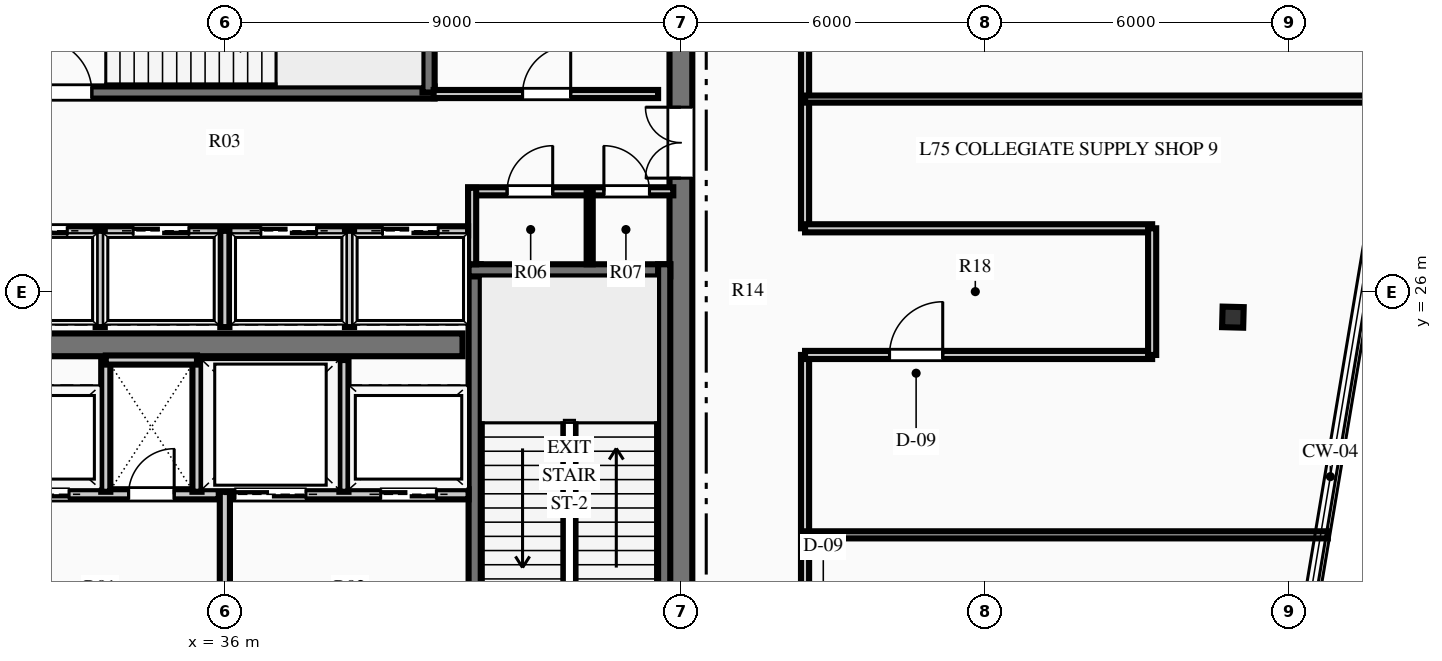
"""IFC4 building model, lengths in metres.
Left out: names, types, materials, properties, quantities, classifications, styles, units other than length and angle.
Written with IfcOpenShell. Run it as: python <this file> out.ifc"""

import sys

from ifc_helpers import new_model, si_unit, direction, frame, frame_2d, origin, origin_2d, place, context, subcontext, project, spatial, rectangle, i_section, extrude, element, fill, save


model = new_model("IFC4")
c1 = context("Model", 3, precision=1e-05, world=origin(), true_north=direction((0.0, 1.0)))
c2 = subcontext(c1, "Body", "Model", "MODEL_VIEW")
j1 = project(units=[si_unit("LENGTHUNIT", "METRE"), si_unit("PLANEANGLEUNIT", "RADIAN")], contexts=[c1])
p1 = place(None, origin())
s1 = spatial("IfcSite", under=j1, at=p1, CompositionType="ELEMENT")
p2 = place(p1, origin())
s2 = spatial("IfcBuilding", under=s1, at=p2, CompositionType="ELEMENT")
p3 = place(p2, frame((0.0, 0.0, 298.2)))
s3 = spatial("IfcBuildingStorey", under=s2, at=p3, CompositionType="ELEMENT", Elevation=298.2)
p4 = place(p3, frame((45.0, 18.225, 0.0), z_axis=(0.0, 0.0, 1.0), x_axis=(0.0, 1.0, 0.0)))
e1 = element("IfcWall", 1, at=p4, inside=s3, PredefinedType="SHEAR", context=c2, shape_type="SweptSolid", body=[
    extrude(rectangle(XDim=15.55, YDim=0.45, at=frame_2d((7.775, 0.0))), origin(), (0.0, 0.0, 1.0), 4.5),
])
p5 = place(p4, frame((10.015, 0.0, 0.0)))
e2 = element("IfcOpeningElement", 2, at=p5, cuts=e1, PredefinedType="OPENING", context=c2, shape_type="SweptSolid", body=[
    extrude(rectangle(XDim=1.4, YDim=2.2, at=frame_2d((0.7, 1.1))), frame((0.0, 0.235, 0.0), z_axis=(0.0, -1.0, 0.0), x_axis=(1.0, 0.0, 0.0)), (0.0, 0.0, 1.0), 0.47),
])
p6 = place(p3, frame((31.31, 24.95, 0.0), z_axis=(0.0, 0.0, 1.0), x_axis=(1.0, 0.0, 0.0)))
e3 = element("IfcWall", 3, at=p6, inside=s3, PredefinedType="SHEAR", context=c2, shape_type="SweptSolid", body=[
    extrude(rectangle(XDim=9.38, YDim=0.45, at=frame_2d((4.69, 0.0))), origin(), (0.0, 0.0, 1.0), 4.5),
])
p7 = place(p3, frame((40.93, 18.28, 0.0), z_axis=(0.0, 0.0, 1.0), x_axis=(0.0, 1.0, 0.0)))
e4 = element("IfcWall", 4, at=p7, inside=s3, PredefinedType="SHEAR", context=c2, shape_type="SweptSolid", body=[
    extrude(rectangle(XDim=8.26, YDim=0.24, at=frame_2d((4.13, 0.0))), origin(), (0.0, 0.0, 1.0), 4.5),
])
p8 = place(p7, frame((0.365, 0.0, 0.0)))
e5 = element("IfcOpeningElement", 5, at=p8, cuts=e4, PredefinedType="OPENING", context=c2, shape_type="SweptSolid", body=[
    extrude(rectangle(XDim=1.05, YDim=2.15, at=frame_2d((0.525, 1.075))), frame((0.0, 0.13, 0.0), z_axis=(0.0, -1.0, 0.0), x_axis=(1.0, 0.0, 0.0)), (0.0, 0.0, 1.0), 0.26),
])
p9 = place(p3, frame((40.81, 26.42, 0.0), z_axis=(0.0, 0.0, 1.0), x_axis=(1.0, 0.0, 0.0)))
e6 = element("IfcWall", 6, at=p9, inside=s3, PredefinedType="SHEAR", context=c2, shape_type="SweptSolid", body=[
    extrude(rectangle(XDim=3.98, YDim=0.24, at=frame_2d((1.99, 0.0))), origin(), (0.0, 0.0, 1.0), 4.5),
])
p10 = place(p3, frame((44.67, 18.28, 0.0), z_axis=(0.0, 0.0, 1.0), x_axis=(0.0, 1.0, 0.0)))
e7 = element("IfcWall", 7, at=p10, inside=s3, PredefinedType="SHEAR", context=c2, shape_type="SweptSolid", body=[
    extrude(rectangle(XDim=8.26, YDim=0.24, at=frame_2d((4.13, 0.0))), origin(), (0.0, 0.0, 1.0), 4.5),
])
p11 = place(p3, frame((31.76, 29.93, 0.0), z_axis=(0.0, 0.0, 1.0), x_axis=(1.0, 0.0, 0.0)))
e8 = element("IfcWall", 8, at=p11, inside=s3, PredefinedType="SHEAR", context=c2, shape_type="SweptSolid", body=[
    extrude(rectangle(XDim=8.38, YDim=0.24, at=frame_2d((4.19, 0.0))), origin(), (0.0, 0.0, 1.0), 4.5),
])
p12 = place(p11, frame((0.565, 0.0, 0.0)))
e9 = element("IfcOpeningElement", 9, at=p12, cuts=e8, PredefinedType="OPENING", context=c2, shape_type="SweptSolid", body=[
    extrude(rectangle(XDim=1.05, YDim=2.15, at=frame_2d((0.525, 1.075))), frame((0.0, 0.13, 0.0), z_axis=(0.0, -1.0, 0.0), x_axis=(1.0, 0.0, 0.0)), (0.0, 0.0, 1.0), 0.26),
])
p13 = place(p3, frame((40.02, 29.93, 0.0), z_axis=(0.0, 0.0, 1.0), x_axis=(0.0, 1.0, 0.0)))
e10 = element("IfcWall", 10, at=p13, inside=s3, PredefinedType="SHEAR", context=c2, shape_type="SweptSolid", body=[
    extrude(rectangle(XDim=3.85, YDim=0.24, at=frame_2d((1.925, 0.0))), origin(), (0.0, 0.0, 1.0), 4.5),
])
p14 = place(p3, frame((55.894, 25.496, 0.0), z_axis=(0.0, 0.0, 1.0), x_axis=(0.025304572866, 0.999679788028, 0.0)))
e11 = element("IfcColumn", 11, at=p14, inside=s3, PredefinedType="COLUMN", context=c2, shape_type="SweptSolid", body=[
    extrude(i_section(OverallWidth=0.406, OverallDepth=0.416, WebThickness=0.03, FlangeThickness=0.048, at=origin_2d()), origin(), (0.0, 0.0, 1.0), 4.5),
])
p15 = place(p3, frame((36.0, 18.28, 0.0), z_axis=(0.0, 0.0, 1.0), x_axis=(0.0, 1.0, 0.0)))
e12 = element("IfcWall", 12, at=p15, inside=s3, PredefinedType="PARTITIONING", context=c2, shape_type="SweptSolid", body=[
    extrude(rectangle(XDim=3.77, YDim=0.2, at=frame_2d((1.885, 0.0))), origin(), (0.0, 0.0, 1.0), 4.24),
])
p16 = place(p3, frame((31.19, 22.0, 0.0), z_axis=(0.0, 0.0, 1.0), x_axis=(1.0, 0.0, 0.0)))
e13 = element("IfcWall", 13, at=p16, inside=s3, PredefinedType="PARTITIONING", context=c2, shape_type="SweptSolid", body=[
    extrude(rectangle(XDim=4.69, YDim=0.2, at=frame_2d((2.345, 0.0))), origin(), (0.0, 0.0, 1.0), 4.24),
])
p17 = place(p16, frame((2.91, 0.0, 0.0)))
e14 = element("IfcOpeningElement", 14, at=p17, cuts=e13, PredefinedType="OPENING", context=c2, shape_type="SweptSolid", body=[
    extrude(rectangle(XDim=0.9, YDim=2.15, at=frame_2d((0.45, 1.075))), frame((0.0, 0.11, 0.0), z_axis=(0.0, -1.0, 0.0), x_axis=(1.0, 0.0, 0.0)), (0.0, 0.0, 1.0), 0.22),
])
p18 = place(p16, frame((0.635, 0.0, 0.0)))
e15 = element("IfcOpeningElement", 15, at=p18, cuts=e13, PredefinedType="OPENING", context=c2, shape_type="SweptSolid", body=[
    extrude(rectangle(XDim=1.1, YDim=2.15, at=frame_2d((0.55, 1.075))), frame((0.0, 0.11, 0.0), z_axis=(0.0, -1.0, 0.0), x_axis=(1.0, 0.0, 0.0)), (0.0, 0.0, 1.0), 0.22),
])
p19 = place(p3, frame((36.12, 22.0, 0.0), z_axis=(0.0, 0.0, 1.0), x_axis=(1.0, 0.0, 0.0)))
e16 = element("IfcWall", 16, at=p19, inside=s3, PredefinedType="PARTITIONING", context=c2, shape_type="SweptSolid", body=[
    extrude(rectangle(XDim=4.69, YDim=0.2, at=frame_2d((2.345, 0.0))), origin(), (0.0, 0.0, 1.0), 4.24),
])
p20 = place(p19, frame((2.955, 0.0, 0.0)))
e17 = element("IfcOpeningElement", 17, at=p20, cuts=e16, PredefinedType="OPENING", context=c2, shape_type="SweptSolid", body=[
    extrude(rectangle(XDim=1.1, YDim=2.15, at=frame_2d((0.55, 1.075))), frame((0.0, 0.11, 0.0), z_axis=(0.0, -1.0, 0.0), x_axis=(1.0, 0.0, 0.0)), (0.0, 0.0, 1.0), 0.22),
])
p21 = place(p19, frame((0.08, 0.0, 0.0)))
e18 = element("IfcOpeningElement", 18, at=p21, cuts=e16, PredefinedType="OPENING", context=c2, shape_type="SweptSolid", body=[
    extrude(rectangle(XDim=1.4, YDim=2.2, at=frame_2d((0.7, 1.1))), frame((0.0, 0.11, 0.0), z_axis=(0.0, -1.0, 0.0), x_axis=(1.0, 0.0, 0.0)), (0.0, 0.0, 1.0), 0.22),
])
for number, where, z_axis, x_axis in (
    (19, (33.65, 22.05, 0.0), (0.0, 0.0, 1.0), (0.0, 1.0, 0.0)),
    (20, (35.45, 22.05, 0.0), (0.0, 0.0, 1.0), (0.0, 1.0, 0.0)),
):
    element("IfcWall", number, at=place(p3, frame(where, z_axis=z_axis, x_axis=x_axis)), inside=s3, PredefinedType="PARTITIONING", context=c2, shape_type="SweptSolid", body=[
        extrude(rectangle(XDim=2.6, YDim=0.18, at=frame_2d((1.3, 0.0))), origin(), (0.0, 0.0, 1.0), 4.24),
    ])
p22 = place(p3, frame((33.65, 24.65, 0.0), z_axis=(0.0, 0.0, 1.0), x_axis=(1.0, 0.0, 0.0)))
e21 = element("IfcWall", 21, at=p22, inside=s3, PredefinedType="PARTITIONING", context=c2, shape_type="SweptSolid", body=[
    extrude(rectangle(XDim=1.8, YDim=0.18, at=frame_2d((0.9, 0.0))), origin(), (0.0, 0.0, 1.0), 4.24),
])
p23 = place(p3, frame((38.35, 22.05, 0.0), z_axis=(0.0, 0.0, 1.0), x_axis=(0.0, 1.0, 0.0)))
e22 = element("IfcWall", 22, at=p23, inside=s3, PredefinedType="PARTITIONING", context=c2, shape_type="SweptSolid", body=[
    extrude(rectangle(XDim=2.6, YDim=0.18, at=frame_2d((1.3, 0.0))), origin(), (0.0, 0.0, 1.0), 4.24),
])
p24 = place(p3, frame((40.8, 27.98, 0.0), z_axis=(0.0, 0.0, 1.0), x_axis=(1.0, 0.0, 0.0)))
e23 = element("IfcWall", 23, at=p24, inside=s3, PredefinedType="PARTITIONING", context=c2, shape_type="SweptSolid", body=[
    extrude(rectangle(XDim=4.05, YDim=0.16, at=frame_2d((2.025, 0.0))), origin(), (0.0, 0.0, 1.0), 4.24),
])
p25 = place(p24, frame((0.77, 0.0, 0.0)))
e24 = element("IfcOpeningElement", 24, at=p25, cuts=e23, PredefinedType="OPENING", context=c2, shape_type="SweptSolid", body=[
    extrude(rectangle(XDim=0.9, YDim=2.15, at=frame_2d((0.45, 1.075))), frame((0.0, 0.09, 0.0), z_axis=(0.0, -1.0, 0.0), x_axis=(1.0, 0.0, 0.0)), (0.0, 0.0, 1.0), 0.18),
])
p26 = place(p24, frame((2.68, 0.0, 0.0)))
e25 = element("IfcOpeningElement", 25, at=p26, cuts=e23, PredefinedType="OPENING", context=c2, shape_type="SweptSolid", body=[
    extrude(rectangle(XDim=0.9, YDim=2.15, at=frame_2d((0.45, 1.075))), frame((0.0, 0.09, 0.0), z_axis=(0.0, -1.0, 0.0), x_axis=(1.0, 0.0, 0.0)), (0.0, 0.0, 1.0), 0.18),
])
p27 = place(p3, frame((40.88, 26.54, 0.0), z_axis=(0.0, 0.0, 1.0), x_axis=(0.0, 1.0, 0.0)))
e26 = element("IfcWall", 26, at=p27, inside=s3, PredefinedType="PARTITIONING", context=c2, shape_type="SweptSolid", body=[
    extrude(rectangle(XDim=1.51, YDim=0.16, at=frame_2d((0.755, 0.0))), origin(), (0.0, 0.0, 1.0), 4.24),
])
p28 = place(p3, frame((43.2, 26.54, 0.0), z_axis=(0.0, 0.0, 1.0), x_axis=(0.0, 1.0, 0.0)))
e27 = element("IfcWall", 27, at=p28, inside=s3, PredefinedType="PARTITIONING", context=c2, shape_type="SweptSolid", body=[
    extrude(rectangle(XDim=1.44, YDim=0.12, at=frame_2d((0.72, 0.0))), origin(), (0.0, 0.0, 1.0), 4.24),
])
p29 = place(p3, frame((40.12, 29.9, 0.0), z_axis=(0.0, 0.0, 1.0), x_axis=(1.0, 0.0, 0.0)))
e28 = element("IfcWall", 28, at=p29, inside=s3, PredefinedType="PARTITIONING", context=c2, shape_type="SweptSolid", body=[
    extrude(rectangle(XDim=4.43, YDim=0.16, at=frame_2d((2.215, 0.0))), origin(), (0.0, 0.0, 1.0), 4.24),
])
p30 = place(p29, frame((1.755, 0.0, 0.0)))
e29 = element("IfcOpeningElement", 29, at=p30, cuts=e28, PredefinedType="OPENING", context=c2, shape_type="SweptSolid", body=[
    extrude(rectangle(XDim=0.95, YDim=2.15, at=frame_2d((0.475, 1.075))), frame((0.0, 0.09, 0.0), z_axis=(0.0, -1.0, 0.0), x_axis=(1.0, 0.0, 0.0)), (0.0, 0.0, 1.0), 0.18),
])
p31 = place(p3, frame((31.2, 27.2, 0.0), z_axis=(0.0, 0.0, 1.0), x_axis=(1.0, 0.0, 0.0)))
e30 = element("IfcWall", 30, at=p31, inside=s3, PredefinedType="PARTITIONING", context=c2, shape_type="SweptSolid", body=[
    extrude(rectangle(XDim=9.6, YDim=0.18, at=frame_2d((4.8, 0.0))), origin(), (0.0, 0.0, 1.0), 4.24),
])
p32 = place(p31, frame((0.59, 0.0, 0.0)))
e31 = element("IfcOpeningElement", 31, at=p32, cuts=e30, PredefinedType="OPENING", context=c2, shape_type="SweptSolid", body=[
    extrude(rectangle(XDim=1.1, YDim=2.15, at=frame_2d((0.55, 1.075))), frame((0.0, 0.1, 0.0), z_axis=(0.0, -1.0, 0.0), x_axis=(1.0, 0.0, 0.0)), (0.0, 0.0, 1.0), 0.2),
])
p33 = place(p31, frame((2.99, 0.0, 0.0)))
e32 = element("IfcOpeningElement", 32, at=p33, cuts=e30, PredefinedType="OPENING", context=c2, shape_type="SweptSolid", body=[
    extrude(rectangle(XDim=1.1, YDim=2.15, at=frame_2d((0.55, 1.075))), frame((0.0, 0.1, 0.0), z_axis=(0.0, -1.0, 0.0), x_axis=(1.0, 0.0, 0.0)), (0.0, 0.0, 1.0), 0.2),
])
p34 = place(p31, frame((5.51, 0.0, 0.0)))
e33 = element("IfcOpeningElement", 33, at=p34, cuts=e30, PredefinedType="OPENING", context=c2, shape_type="SweptSolid", body=[
    extrude(rectangle(XDim=1.1, YDim=2.15, at=frame_2d((0.55, 1.075))), frame((0.0, 0.1, 0.0), z_axis=(0.0, -1.0, 0.0), x_axis=(1.0, 0.0, 0.0)), (0.0, 0.0, 1.0), 0.2),
])
p35 = place(p31, frame((7.91, 0.0, 0.0)))
e34 = element("IfcOpeningElement", 34, at=p35, cuts=e30, PredefinedType="OPENING", context=c2, shape_type="SweptSolid", body=[
    extrude(rectangle(XDim=1.1, YDim=2.15, at=frame_2d((0.55, 1.075))), frame((0.0, 0.1, 0.0), z_axis=(0.0, -1.0, 0.0), x_axis=(1.0, 0.0, 0.0)), (0.0, 0.0, 1.0), 0.2),
])
for number, where, z_axis, x_axis in (
    (35, (33.54, 25.3, 0.0), (0.0, 0.0, 1.0), (0.0, 1.0, 0.0)),
    (36, (36.0, 25.3, 0.0), (0.0, 0.0, 1.0), (0.0, 1.0, 0.0)),
    (37, (38.46, 25.3, 0.0), (0.0, 0.0, 1.0), (0.0, 1.0, 0.0)),
):
    element("IfcWall", number, at=place(p3, frame(where, z_axis=z_axis, x_axis=x_axis)), inside=s3, PredefinedType="PARTITIONING", context=c2, shape_type="SweptSolid", body=[
        extrude(rectangle(XDim=1.9, YDim=0.18, at=frame_2d((0.95, 0.0))), origin(), (0.0, 0.0, 1.0), 4.24),
    ])
p36 = place(p3, frame((47.45, 15.55, 0.0), z_axis=(0.0, 0.0, 1.0), x_axis=(0.0, 1.0, 0.0)))
e38 = element("IfcWall", 38, at=p36, inside=s3, PredefinedType="PARTITIONING", context=c2, shape_type="SweptSolid", body=[
    extrude(rectangle(XDim=9.2, YDim=0.16, at=frame_2d((4.6, 0.0))), origin(), (0.0, 0.0, 1.0), 4.24),
])
p37 = place(p36, frame((3.543, 0.0, 0.0)))
e39 = element("IfcOpeningElement", 39, at=p37, cuts=e38, PredefinedType="OPENING", context=c2, shape_type="SweptSolid", body=[
    extrude(rectangle(XDim=1.05, YDim=2.15, at=frame_2d((0.525, 1.075))), frame((0.0, 0.09, 0.0), z_axis=(0.0, -1.0, 0.0), x_axis=(1.0, 0.0, 0.0)), (0.0, 0.0, 1.0), 0.18),
])
p38 = place(p3, frame((47.45, 27.25, 0.0), z_axis=(0.0, 0.0, 1.0), x_axis=(0.0, 1.0, 0.0)))
e40 = element("IfcWall", 40, at=p38, inside=s3, PredefinedType="PARTITIONING", context=c2, shape_type="SweptSolid", body=[
    extrude(rectangle(XDim=9.2, YDim=0.16, at=frame_2d((4.6, 0.0))), origin(), (0.0, 0.0, 1.0), 4.24),
])
p39 = place(p38, frame((3.927, 0.0, 0.0)))
e41 = element("IfcOpeningElement", 41, at=p39, cuts=e40, PredefinedType="OPENING", context=c2, shape_type="SweptSolid", body=[
    extrude(rectangle(XDim=1.05, YDim=2.15, at=frame_2d((0.525, 1.075))), frame((0.0, 0.09, 0.0), z_axis=(0.0, -1.0, 0.0), x_axis=(1.0, 0.0, 0.0)), (0.0, 0.0, 1.0), 0.18),
])
p40 = place(p3, frame((47.45, 24.75, 0.0), z_axis=(0.0, 0.0, 1.0), x_axis=(1.0, 0.0, 0.0)))
e42 = element("IfcWall", 42, at=p40, inside=s3, PredefinedType="PARTITIONING", context=c2, shape_type="SweptSolid", body=[
    extrude(rectangle(XDim=6.85, YDim=0.16, at=frame_2d((3.425, 0.0))), origin(), (0.0, 0.0, 1.0), 4.24),
])
p41 = place(p40, frame((1.667, 0.0, 0.0)))
e43 = element("IfcOpeningElement", 43, at=p41, cuts=e42, PredefinedType="OPENING", context=c2, shape_type="SweptSolid", body=[
    extrude(rectangle(XDim=1.05, YDim=2.15, at=frame_2d((0.525, 1.075))), frame((0.0, 0.09, 0.0), z_axis=(0.0, -1.0, 0.0), x_axis=(1.0, 0.0, 0.0)), (0.0, 0.0, 1.0), 0.18),
])
p42 = place(p3, frame((47.45, 27.25, 0.0), z_axis=(0.0, 0.0, 1.0), x_axis=(1.0, 0.0, 0.0)))
e44 = element("IfcWall", 44, at=p42, inside=s3, PredefinedType="PARTITIONING", context=c2, shape_type="SweptSolid", body=[
    extrude(rectangle(XDim=6.85, YDim=0.16, at=frame_2d((3.425, 0.0))), origin(), (0.0, 0.0, 1.0), 4.24),
])
p43 = place(p3, frame((54.3, 24.75, 0.0), z_axis=(0.0, 0.0, 1.0), x_axis=(0.0, 1.0, 0.0)))
e45 = element("IfcWall", 45, at=p43, inside=s3, PredefinedType="PARTITIONING", context=c2, shape_type="SweptSolid", body=[
    extrude(rectangle(XDim=2.5, YDim=0.16, at=frame_2d((1.25, 0.0))), origin(), (0.0, 0.0, 1.0), 4.24),
])
p44 = place(p3, frame((47.45, 21.2, 0.0), z_axis=(0.0, 0.0, 1.0), x_axis=(1.0, 0.0, 0.0)))
e46 = element("IfcWall", 46, at=p44, inside=s3, PredefinedType="PARTITIONING", context=c2, shape_type="SweptSolid", body=[
    extrude(rectangle(XDim=10.316, YDim=0.14, at=frame_2d((5.158, 0.0))), origin(), (0.0, 0.0, 1.0), 4.24),
])
p45 = place(p3, frame((47.45, 29.8, 0.0), z_axis=(0.0, 0.0, 1.0), x_axis=(1.0, 0.0, 0.0)))
e47 = element("IfcWall", 47, at=p45, inside=s3, PredefinedType="PARTITIONING", context=c2, shape_type="SweptSolid", body=[
    extrude(rectangle(XDim=11.756, YDim=0.14, at=frame_2d((5.878, 0.0))), origin(), (0.0, 0.0, 1.0), 4.24),
])
p46 = place(p25, origin())
e48 = element("IfcDoor", 48, at=p46, inside=s3, OperationType="SINGLE_SWING_RIGHT", PredefinedType="DOOR", context=c2, shape_type="SweptSolid", body=[
    extrude(rectangle(XDim=0.9, YDim=2.15, at=frame_2d((0.45, 1.075))), frame((0.0, 0.025, 0.0), z_axis=(0.0, -1.0, 0.0), x_axis=(1.0, 0.0, 0.0)), (0.0, 0.0, 1.0), 0.05),
])
fill(e24, e48)
p47 = place(p26, origin())
e49 = element("IfcDoor", 49, at=p47, inside=s3, OperationType="SINGLE_SWING_LEFT", PredefinedType="DOOR", context=c2, shape_type="SweptSolid", body=[
    extrude(rectangle(XDim=0.9, YDim=2.15, at=frame_2d((0.45, 1.075))), frame((0.0, 0.025, 0.0), z_axis=(0.0, -1.0, 0.0), x_axis=(1.0, 0.0, 0.0)), (0.0, 0.0, 1.0), 0.05),
])
fill(e25, e49)
p48 = place(p30, origin())
e50 = element("IfcDoor", 50, at=p48, inside=s3, OperationType="SINGLE_SWING_RIGHT", PredefinedType="DOOR", context=c2, shape_type="SweptSolid", body=[
    extrude(rectangle(XDim=0.95, YDim=2.15, at=frame_2d((0.475, 1.075))), frame((0.0, 0.025, 0.0), z_axis=(0.0, -1.0, 0.0), x_axis=(1.0, 0.0, 0.0)), (0.0, 0.0, 1.0), 0.05),
])
fill(e29, e50)
p49 = place(p12, origin())
e51 = element("IfcDoor", 51, at=p49, inside=s3, OperationType="SINGLE_SWING_LEFT", PredefinedType="DOOR", context=c2, shape_type="SweptSolid", body=[
    extrude(rectangle(XDim=1.05, YDim=2.15, at=frame_2d((0.525, 1.075))), frame((0.0, 0.025, 0.0), z_axis=(0.0, -1.0, 0.0), x_axis=(1.0, 0.0, 0.0)), (0.0, 0.0, 1.0), 0.05),
])
fill(e9, e51)
p50 = place(p17, origin())
e52 = element("IfcDoor", 52, at=p50, inside=s3, OperationType="SINGLE_SWING_RIGHT", PredefinedType="DOOR", context=c2, shape_type="SweptSolid", body=[
    extrude(rectangle(XDim=0.9, YDim=2.15, at=frame_2d((0.45, 1.075))), frame((0.0, 0.025, 0.0), z_axis=(0.0, -1.0, 0.0), x_axis=(1.0, 0.0, 0.0)), (0.0, 0.0, 1.0), 0.05),
])
fill(e14, e52)
p51 = place(p5, origin())
e53 = element("IfcDoor", 53, at=p51, inside=s3, OperationType="DOUBLE_DOOR_SINGLE_SWING", PredefinedType="DOOR", context=c2, shape_type="SweptSolid", body=[
    extrude(rectangle(XDim=1.4, YDim=2.2, at=frame_2d((0.7, 1.1))), frame((0.0, 0.025, 0.0), z_axis=(0.0, -1.0, 0.0), x_axis=(1.0, 0.0, 0.0)), (0.0, 0.0, 1.0), 0.05),
])
fill(e2, e53)
p52 = place(p41, origin())
e54 = element("IfcDoor", 54, at=p52, inside=s3, OperationType="SINGLE_SWING_RIGHT", PredefinedType="DOOR", context=c2, shape_type="SweptSolid", body=[
    extrude(rectangle(XDim=1.05, YDim=2.15, at=frame_2d((0.525, 1.075))), frame((0.0, 0.025, 0.0), z_axis=(0.0, -1.0, 0.0), x_axis=(1.0, 0.0, 0.0)), (0.0, 0.0, 1.0), 0.05),
])
fill(e43, e54)
p53 = place(p32, origin())
e55 = element("IfcDoor", 55, at=p53, inside=s3, OperationType="SLIDING_TO_LEFT", PredefinedType="DOOR", context=c2, shape_type="SweptSolid", body=[
    extrude(rectangle(XDim=1.1, YDim=2.15, at=frame_2d((0.55, 1.075))), frame((0.0, 0.025, 0.0), z_axis=(0.0, -1.0, 0.0), x_axis=(1.0, 0.0, 0.0)), (0.0, 0.0, 1.0), 0.05),
])
fill(e31, e55)
p54 = place(p33, origin())
e56 = element("IfcDoor", 56, at=p54, inside=s3, OperationType="SLIDING_TO_LEFT", PredefinedType="DOOR", context=c2, shape_type="SweptSolid", body=[
    extrude(rectangle(XDim=1.1, YDim=2.15, at=frame_2d((0.55, 1.075))), frame((0.0, 0.025, 0.0), z_axis=(0.0, -1.0, 0.0), x_axis=(1.0, 0.0, 0.0)), (0.0, 0.0, 1.0), 0.05),
])
fill(e32, e56)
p55 = place(p34, origin())
e57 = element("IfcDoor", 57, at=p55, inside=s3, OperationType="SLIDING_TO_LEFT", PredefinedType="DOOR", context=c2, shape_type="SweptSolid", body=[
    extrude(rectangle(XDim=1.1, YDim=2.15, at=frame_2d((0.55, 1.075))), frame((0.0, 0.025, 0.0), z_axis=(0.0, -1.0, 0.0), x_axis=(1.0, 0.0, 0.0)), (0.0, 0.0, 1.0), 0.05),
])
fill(e33, e57)
p56 = place(p35, origin())
e58 = element("IfcDoor", 58, at=p56, inside=s3, OperationType="SLIDING_TO_LEFT", PredefinedType="DOOR", context=c2, shape_type="SweptSolid", body=[
    extrude(rectangle(XDim=1.1, YDim=2.15, at=frame_2d((0.55, 1.075))), frame((0.0, 0.025, 0.0), z_axis=(0.0, -1.0, 0.0), x_axis=(1.0, 0.0, 0.0)), (0.0, 0.0, 1.0), 0.05),
])
fill(e34, e58)
p57 = place(p18, origin())
e59 = element("IfcDoor", 59, at=p57, inside=s3, OperationType="SLIDING_TO_LEFT", PredefinedType="DOOR", context=c2, shape_type="SweptSolid", body=[
    extrude(rectangle(XDim=1.1, YDim=2.15, at=frame_2d((0.55, 1.075))), frame((0.0, 0.025, 0.0), z_axis=(0.0, -1.0, 0.0), x_axis=(1.0, 0.0, 0.0)), (0.0, 0.0, 1.0), 0.05),
])
fill(e15, e59)
p58 = place(p20, origin())
e60 = element("IfcDoor", 60, at=p58, inside=s3, OperationType="SLIDING_TO_LEFT", PredefinedType="DOOR", context=c2, shape_type="SweptSolid", body=[
    extrude(rectangle(XDim=1.1, YDim=2.15, at=frame_2d((0.55, 1.075))), frame((0.0, 0.025, 0.0), z_axis=(0.0, -1.0, 0.0), x_axis=(1.0, 0.0, 0.0)), (0.0, 0.0, 1.0), 0.05),
])
fill(e17, e60)
p59 = place(p21, origin())
e61 = element("IfcDoor", 61, at=p59, inside=s3, OperationType="SLIDING_TO_LEFT", PredefinedType="DOOR", context=c2, shape_type="SweptSolid", body=[
    extrude(rectangle(XDim=1.4, YDim=2.2, at=frame_2d((0.7, 1.1))), frame((0.0, 0.025, 0.0), z_axis=(0.0, -1.0, 0.0), x_axis=(1.0, 0.0, 0.0)), (0.0, 0.0, 1.0), 0.05),
])
fill(e18, e61)
save(model, sys.argv[1])
